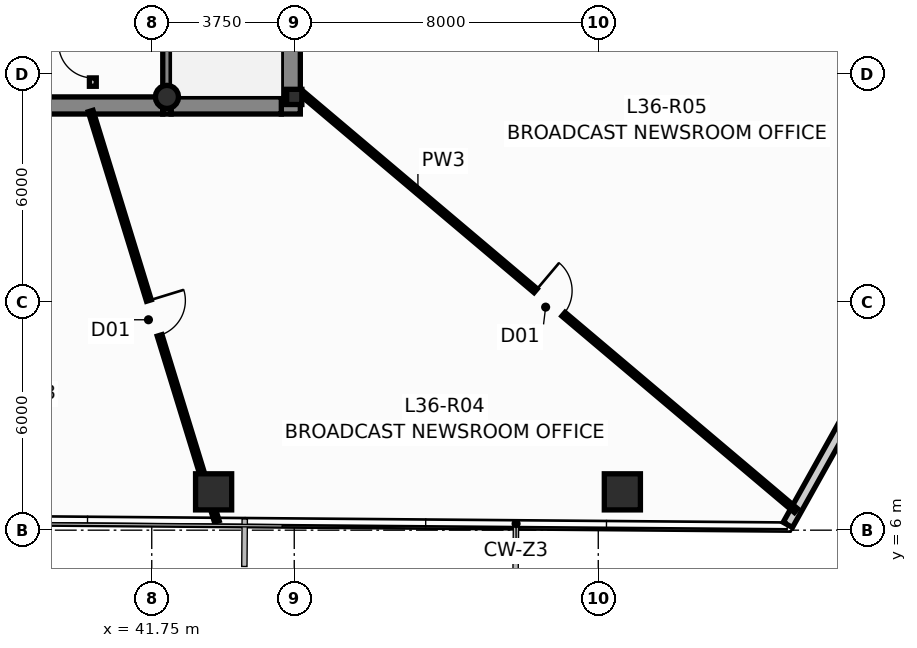
"""IFC4 building model, lengths in metres.
Left out: names, types, materials, properties, quantities, classifications, styles, units other than length and angle.
Written with IfcOpenShell. Run it as: python <this file> out.ifc"""

import sys

from ifc_helpers import new_model, si_unit, direction, frame, frame_2d, origin, origin_2d, place, context, subcontext, project, spatial, rectangle, hollow_rectangle, hollow_circle, i_section, extrude, source, transform, mapped, element, fill, save


model = new_model("IFC4")
c1 = context("Model", 3, precision=1e-05, world=origin(), true_north=direction((0.0, 1.0)))
c2 = subcontext(c1, "Body", "Model", "MODEL_VIEW")
j1 = project(units=[si_unit("LENGTHUNIT", "METRE"), si_unit("PLANEANGLEUNIT", "RADIAN")], contexts=[c1])
p1 = place(None, origin())
s1 = spatial("IfcSite", under=j1, at=p1, CompositionType="ELEMENT")
p2 = place(p1, origin())
s2 = spatial("IfcBuilding", under=s1, at=p2, CompositionType="ELEMENT")
p3 = place(p2, frame((0.0, 0.0, 139.1)))
s3 = spatial("IfcBuildingStorey", under=s2, at=p3, CompositionType="ELEMENT", Elevation=139.1)
m1 = source(origin(), c2, "Body", "SweptSolid", [
    extrude(i_section(OverallWidth=0.4, OverallDepth=0.4, WebThickness=0.02, FlangeThickness=0.032, at=origin_2d()), origin(), (0.0, 0.0, 1.0), 3.65),
])
p4 = place(p3, frame((45.5, 17.4, 0.0), z_axis=(0.0, 0.0, 1.0), x_axis=(1.0, 0.0, 0.0)))
e1 = element("IfcColumn", 1, at=p4, inside=s3, PredefinedType="COLUMN", context=c2, shape_type="MappedRepresentation", body=[
    mapped(m1, transform((0.0, 0.0, 0.0), scale=1.0)),
])
m2 = source(origin(), c2, "Body", "SweptSolid", [
    extrude(hollow_circle(Radius=0.305, WallThickness=0.025, at=origin_2d()), origin(), (0.0, 0.0, 1.0), 3.65),
])
p5 = place(p3, frame((42.15, 17.4, 0.0), z_axis=(0.0, 0.0, 1.0), x_axis=(1.0, 0.0, 0.0)))
e2 = element("IfcColumn", 2, at=p5, inside=s3, PredefinedType="COLUMN", context=c2, shape_type="MappedRepresentation", body=[
    mapped(m2, transform((0.0, 0.0, 0.0), scale=1.0)),
])
p6 = place(p3, frame((45.41, 16.95, 0.0), z_axis=(0.0, 0.0, 1.0), x_axis=(0.0, 1.0, 0.0)))
e3 = element("IfcWall", 3, at=p6, inside=s3, PredefinedType="SHEAR", context=c2, shape_type="SweptSolid", body=[
    extrude(rectangle(XDim=13.275, YDim=0.5, at=frame_2d((6.638, 0.0))), origin(), (0.0, 0.0, 1.0), 3.65),
])
p7 = place(p6, frame((6.4, 0.0, 0.0)))
e4 = element("IfcOpeningElement", 4, at=p7, cuts=e3, PredefinedType="OPENING", context=c2, shape_type="SweptSolid", body=[
    extrude(rectangle(XDim=1.12, YDim=2.15, at=frame_2d((0.56, 1.075))), frame((0.0, 0.262, 0.0), z_axis=(0.0, -1.0, 0.0), x_axis=(1.0, 0.0, 0.0)), (0.0, 0.0, 1.0), 0.524),
])
p8 = place(p6, frame((10.85, 0.0, 0.0)))
e5 = element("IfcOpeningElement", 5, at=p8, cuts=e3, PredefinedType="OPENING", context=c2, shape_type="SweptSolid", body=[
    extrude(rectangle(XDim=1.2, YDim=2.2, at=frame_2d((0.6, 1.1))), frame((0.0, 0.262, 0.0), z_axis=(0.0, -1.0, 0.0), x_axis=(1.0, 0.0, 0.0)), (0.0, 0.0, 1.0), 0.524),
])
p9 = place(p3, frame((33.96, 17.175, 0.0), z_axis=(0.0, 0.0, 1.0), x_axis=(1.0, 0.0, 0.0)))
e6 = element("IfcWall", 6, at=p9, inside=s3, PredefinedType="SHEAR", context=c2, shape_type="SweptSolid", body=[
    extrude(rectangle(XDim=8.08, YDim=0.45, at=frame_2d((4.04, 0.0))), origin(), (0.0, 0.0, 1.0), 3.65),
])
p10 = place(p3, frame((42.26, 17.175, 0.0), z_axis=(0.0, 0.0, 1.0), x_axis=(1.0, 0.0, 0.0)))
e7 = element("IfcWall", 7, at=p10, inside=s3, PredefinedType="SHEAR", context=c2, shape_type="SweptSolid", body=[
    extrude(rectangle(XDim=2.9, YDim=0.45, at=frame_2d((1.45, 0.0))), origin(), (0.0, 0.0, 1.0), 3.65),
])
p11 = place(p3, frame((42.15, 16.95, 0.0), z_axis=(0.0, 0.0, 1.0), x_axis=(0.0, 1.0, 0.0)))
e8 = element("IfcWall", 8, at=p11, inside=s3, PredefinedType="SHEAR", context=c2, shape_type="SweptSolid", body=[
    extrude(rectangle(XDim=13.275, YDim=0.22, at=frame_2d((6.638, 0.0))), origin(), (0.0, 0.0, 1.0), 3.65),
])
m3 = source(origin(), c2, "Body", "SweptSolid", [
    extrude(hollow_rectangle(XDim=0.95, YDim=0.95, WallThickness=0.05, at=origin_2d()), origin(), (0.0, 0.0, 1.0), 3.651),
])
p12 = place(p3, frame((43.378, 7.009, 0.0), z_axis=(0.004480682206, 0.019795252729, 0.999794014513), x_axis=(-0.975326687046, 0.220766513622, 0.0)))
e9 = element("IfcColumn", 9, at=p12, inside=s3, PredefinedType="COLUMN", context=c2, shape_type="MappedRepresentation", body=[
    mapped(m3, transform((0.0, 0.0, 0.0), scale=1.0)),
])
m4 = source(origin(), c2, "Body", "SweptSolid", [
    extrude(hollow_rectangle(XDim=0.95, YDim=0.95, WallThickness=0.05, at=origin_2d()), origin(), (0.0, 0.0, 1.0), 3.651),
])
p13 = place(p3, frame((54.134, 7.009, 0.0), z_axis=(0.013440967269, 0.019793663242, 0.999713734673), x_axis=(-0.827290216258, 0.561774775229, 0.0)))
e10 = element("IfcColumn", 10, at=p13, inside=s3, PredefinedType="COLUMN", context=c2, shape_type="MappedRepresentation", body=[
    mapped(m4, transform((0.0, 0.0, 0.0), scale=1.0)),
])
p14 = place(p3, frame((63.715, 15.493, 0.0), z_axis=(0.0, 0.0, 1.0), x_axis=(-0.487869868268, -0.872916371502, 0.0)))
e11 = element("IfcWall", 11, at=p14, inside=s3, PredefinedType="STANDARD", context=c2, shape_type="SweptSolid", body=[
    extrude(rectangle(XDim=10.716, YDim=0.28, at=frame_2d((5.358, 0.0))), origin(), (0.0, 0.0, 1.0), 3.4),
])
p15 = place(p14, frame((4.61, 0.0, 0.9)))
e12 = element("IfcOpeningElement", 12, at=p15, cuts=e11, PredefinedType="OPENING", context=c2, shape_type="SweptSolid", body=[
    extrude(rectangle(XDim=1.5, YDim=1.8, at=frame_2d((0.75, 0.9))), frame((0.0, 0.152, 0.0), z_axis=(0.0, -1.0, 0.0), x_axis=(1.0, 0.0, 0.0)), (0.0, 0.0, 1.0), 0.304),
])
p16 = place(p3, frame((40.2, 17.68, 0.0), z_axis=(0.0, 0.0, 1.0), x_axis=(0.0, 1.0, 0.0)))
e13 = element("IfcWall", 13, at=p16, inside=s3, PredefinedType="PARTITIONING", context=c2, shape_type="SweptSolid", body=[
    extrude(rectangle(XDim=2.7, YDim=0.18, at=frame_2d((1.35, 0.0))), origin(), (0.0, 0.0, 1.0), 3.4),
])
p17 = place(p16, frame((0.22, 0.0, 0.0)))
e14 = element("IfcOpeningElement", 14, at=p17, cuts=e13, PredefinedType="OPENING", context=c2, shape_type="SweptSolid", body=[
    extrude(rectangle(XDim=0.9, YDim=2.1, at=frame_2d((0.45, 1.05))), frame((0.0, 0.102, 0.0), z_axis=(0.0, -1.0, 0.0), x_axis=(1.0, 0.0, 0.0)), (0.0, 0.0, 1.0), 0.204),
])
p18 = place(p16, frame((1.54, 0.0, 0.0)))
e15 = element("IfcOpeningElement", 15, at=p18, cuts=e13, PredefinedType="OPENING", context=c2, shape_type="SweptSolid", body=[
    extrude(rectangle(XDim=0.9, YDim=2.1, at=frame_2d((0.45, 1.05))), frame((0.0, 0.102, 0.0), z_axis=(0.0, -1.0, 0.0), x_axis=(1.0, 0.0, 0.0)), (0.0, 0.0, 1.0), 0.204),
])
p19 = place(p3, frame((45.657, 17.532, 0.0), z_axis=(0.0, 0.0, 1.0), x_axis=(0.764017699992, -0.645195283692, 0.0)))
e16 = element("IfcWall", 16, at=p19, inside=s3, PredefinedType="PARTITIONING", context=c2, shape_type="SweptSolid", body=[
    extrude(rectangle(XDim=17.076, YDim=0.13, at=frame_2d((8.538, 0.0))), origin(), (0.0, 0.0, 1.0), 2.925),
])
p20 = place(p19, frame((8.108, 0.0, 0.0)))
e17 = element("IfcOpeningElement", 17, at=p20, cuts=e16, PredefinedType="OPENING", context=c2, shape_type="SweptSolid", body=[
    extrude(rectangle(XDim=0.96, YDim=2.15, at=frame_2d((0.48, 1.075))), frame((0.0, 0.077, 0.0), z_axis=(0.0, -1.0, 0.0), x_axis=(1.0, 0.0, 0.0)), (0.0, 0.0, 1.0), 0.154),
])
p21 = place(p3, frame((40.142, 17.028, 0.0), z_axis=(0.0, 0.0, 1.0), x_axis=(0.293908154099, -0.955833665945, 0.0)))
e18 = element("IfcWall", 18, at=p21, inside=s3, PredefinedType="PARTITIONING", context=c2, shape_type="SweptSolid", body=[
    extrude(rectangle(XDim=11.296, YDim=0.13, at=frame_2d((5.648, 0.0))), origin(), (0.0, 0.0, 1.0), 3.4),
])
p22 = place(p21, frame((5.216, 0.0, 0.0)))
e19 = element("IfcOpeningElement", 19, at=p22, cuts=e18, PredefinedType="OPENING", context=c2, shape_type="SweptSolid", body=[
    extrude(rectangle(XDim=0.96, YDim=2.15, at=frame_2d((0.48, 1.075))), frame((0.0, 0.077, 0.0), z_axis=(0.0, -1.0, 0.0), x_axis=(1.0, 0.0, 0.0)), (0.0, 0.0, 1.0), 0.154),
])
p23 = place(p17, origin())
e20 = element("IfcDoor", 20, at=p23, inside=s3, OperationType="SINGLE_SWING_RIGHT", PredefinedType="DOOR", context=c2, shape_type="SweptSolid", body=[
    extrude(rectangle(XDim=0.9, YDim=2.1, at=frame_2d((0.45, 1.05))), frame((0.0, 0.025, 0.0), z_axis=(0.0, -1.0, 0.0), x_axis=(1.0, 0.0, 0.0)), (0.0, 0.0, 1.0), 0.05),
])
fill(e14, e20)
p24 = place(p20, origin())
e21 = element("IfcDoor", 21, at=p24, inside=s3, OperationType="SINGLE_SWING_LEFT", PredefinedType="DOOR", context=c2, shape_type="SweptSolid", body=[
    extrude(rectangle(XDim=0.96, YDim=2.15, at=frame_2d((0.48, 1.075))), frame((0.0, 0.025, 0.0), z_axis=(0.0, -1.0, 0.0), x_axis=(1.0, 0.0, 0.0)), (0.0, 0.0, 1.0), 0.05),
])
fill(e17, e21)
p25 = place(p22, origin())
e22 = element("IfcDoor", 22, at=p25, inside=s3, OperationType="SINGLE_SWING_LEFT", PredefinedType="DOOR", context=c2, shape_type="SweptSolid", body=[
    extrude(rectangle(XDim=0.96, YDim=2.15, at=frame_2d((0.48, 1.075))), frame((0.0, 0.025, 0.0), z_axis=(0.0, -1.0, 0.0), x_axis=(1.0, 0.0, 0.0)), (0.0, 0.0, 1.0), 0.05),
])
fill(e19, e22)
save(model, sys.argv[1])
